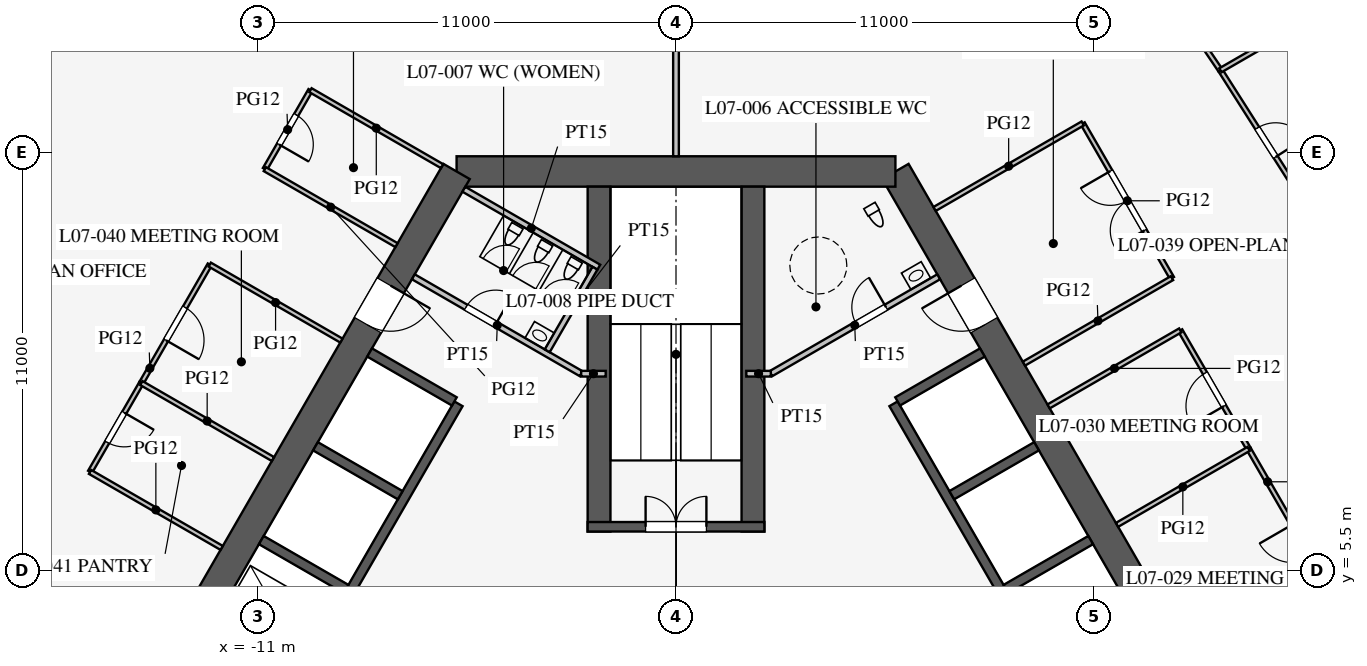
"""IFC4 building model, lengths in metres.
Left out: names, types, materials, properties, quantities, classifications, styles, units other than length and angle.
Written with IfcOpenShell. Run it as: python <this file> out.ifc"""

import sys

from ifc_helpers import new_model, si_unit, direction, frame, frame_2d, origin, place, context, subcontext, project, spatial, rectangle, extrude, element, fill, save


model = new_model("IFC4")
c1 = context("Model", 3, precision=1e-05, world=origin(), true_north=direction((0.0, 1.0)))
c2 = subcontext(c1, "Body", "Model", "MODEL_VIEW")
j1 = project(units=[si_unit("LENGTHUNIT", "METRE"), si_unit("PLANEANGLEUNIT", "RADIAN")], contexts=[c1])
p1 = place(None, origin())
s1 = spatial("IfcSite", under=j1, at=p1, CompositionType="ELEMENT")
p2 = place(p1, origin())
s2 = spatial("IfcBuilding", under=s1, at=p2, CompositionType="ELEMENT")
p3 = place(p2, frame((0.0, 0.0, 33.3)))
s3 = spatial("IfcBuildingStorey", under=s2, at=p3, CompositionType="ELEMENT", Elevation=33.3)
p4 = place(p3, frame((16.743, -3.0, 0.0), z_axis=(0.0, 0.0, 1.0), x_axis=(-0.500002442456, 0.866023993627, 0.0)))
e1 = element("IfcWall", 1, at=p4, inside=s3, PredefinedType="SHEAR", context=c2, shape_type="SweptSolid", body=[
    extrude(rectangle(XDim=21.939, YDim=0.8, at=frame_2d((10.97, 0.0))), origin(), (0.0, 0.0, 1.0), 4.2),
])
p5 = place(p4, frame((17.27, 0.0, 0.0)))
e2 = element("IfcOpeningElement", 2, at=p5, cuts=e1, PredefinedType="OPENING", context=c2, shape_type="SweptSolid", body=[
    extrude(rectangle(XDim=1.2, YDim=2.1, at=frame_2d((0.6, 1.05))), frame((0.0, 0.41, 0.0), z_axis=(0.0, -1.0, 0.0), x_axis=(1.0, 0.0, 0.0)), (0.0, 0.0, 1.0), 0.82),
])
p6 = place(p4, frame((3.47, 0.0, 0.0)))
e3 = element("IfcOpeningElement", 3, at=p6, cuts=e1, PredefinedType="OPENING", context=c2, shape_type="SweptSolid", body=[
    extrude(rectangle(XDim=1.2, YDim=2.1, at=frame_2d((0.6, 1.05))), frame((0.0, 0.41, 0.0), z_axis=(0.0, -1.0, 0.0), x_axis=(1.0, 0.0, 0.0)), (0.0, 0.0, 1.0), 0.82),
])
p7 = place(p3, frame((5.773, 16.0, 0.0), z_axis=(0.0, 0.0, 1.0), x_axis=(-1.0, 0.0, 0.0)))
e4 = element("IfcWall", 4, at=p7, inside=s3, PredefinedType="SHEAR", context=c2, shape_type="SweptSolid", body=[
    extrude(rectangle(XDim=11.547, YDim=0.8, at=frame_2d((5.773, 0.0))), origin(), (0.0, 0.0, 1.0), 4.2),
])
p8 = place(p3, frame((-5.773, 16.0, 0.0), z_axis=(0.0, 0.0, 1.0), x_axis=(-0.500002442456, -0.866023993627, 0.0)))
e5 = element("IfcWall", 5, at=p8, inside=s3, PredefinedType="SHEAR", context=c2, shape_type="SweptSolid", body=[
    extrude(rectangle(XDim=21.939, YDim=0.8, at=frame_2d((10.97, 0.0))), origin(), (0.0, 0.0, 1.0), 4.2),
])
p9 = place(p8, frame((17.27, 0.0, 0.0)))
e6 = element("IfcOpeningElement", 6, at=p9, cuts=e5, PredefinedType="OPENING", context=c2, shape_type="SweptSolid", body=[
    extrude(rectangle(XDim=1.2, YDim=2.1, at=frame_2d((0.6, 1.05))), frame((0.0, 0.41, 0.0), z_axis=(0.0, -1.0, 0.0), x_axis=(1.0, 0.0, 0.0)), (0.0, 0.0, 1.0), 0.82),
])
p10 = place(p8, frame((3.47, 0.0, 0.0)))
e7 = element("IfcOpeningElement", 7, at=p10, cuts=e5, PredefinedType="OPENING", context=c2, shape_type="SweptSolid", body=[
    extrude(rectangle(XDim=1.2, YDim=2.1, at=frame_2d((0.6, 1.05))), frame((0.0, 0.41, 0.0), z_axis=(0.0, -1.0, 0.0), x_axis=(1.0, 0.0, 0.0)), (0.0, 0.0, 1.0), 0.82),
])
p11 = place(p3, frame((11.424, 0.014, 0.0), z_axis=(0.0, 0.0, 1.0), x_axis=(-0.500001763848, 0.866024385424, 0.0)))
e8 = element("IfcWall", 8, at=p11, inside=s3, PredefinedType="SHEAR", context=c2, shape_type="SweptSolid", body=[
    extrude(rectangle(XDim=11.4, YDim=0.25, at=frame_2d((5.7, 0.0))), origin(), (0.0, 0.0, 1.0), 4.2),
])
for number, where, z_axis, x_axis in (
    (9, (8.682, 5.012, 0.0), (0.0, 0.0, 1.0), (0.866, 0.5, 0.0)),
    (10, (7.257, 7.481, 0.0), (0.0, 0.0, 1.0), (0.866, 0.5, 0.0)),
):
    element("IfcWall", number, at=place(p3, frame(where, z_axis=z_axis, x_axis=x_axis)), inside=s3, PredefinedType="SHEAR", context=c2, shape_type="SweptSolid", body=[
        extrude(rectangle(XDim=2.575, YDim=0.25, at=frame_2d((1.288, 0.0))), origin(), (0.0, 0.0, 1.0), 4.2),
    ])
p12 = place(p3, frame((5.832, 9.949, 0.0), z_axis=(0.0, 0.0, 1.0), x_axis=(0.866029291668, 0.499993265928, 0.0)))
e11 = element("IfcWall", 11, at=p12, inside=s3, PredefinedType="SHEAR", context=c2, shape_type="SweptSolid", body=[
    extrude(rectangle(XDim=2.575, YDim=0.25, at=frame_2d((1.288, 0.0))), origin(), (0.0, 0.0, 1.0), 4.2),
])
p13 = place(p3, frame((-5.724, 9.886, 0.0), z_axis=(0.0, 0.0, 1.0), x_axis=(-0.500001763848, -0.866024385424, 0.0)))
e12 = element("IfcWall", 12, at=p13, inside=s3, PredefinedType="SHEAR", context=c2, shape_type="SweptSolid", body=[
    extrude(rectangle(XDim=11.4, YDim=0.25, at=frame_2d((5.7, 0.0))), origin(), (0.0, 0.0, 1.0), 4.2),
])
p14 = place(p13, frame((6.525, 0.0, 0.0)))
e13 = element("IfcOpeningElement", 13, at=p14, cuts=e12, PredefinedType="OPENING", context=c2, shape_type="SweptSolid", body=[
    extrude(rectangle(XDim=1.2, YDim=2.2, at=frame_2d((0.6, 1.1))), frame((0.0, 0.135, 0.0), z_axis=(0.0, -1.0, 0.0), x_axis=(1.0, 0.0, 0.0)), (0.0, 0.0, 1.0), 0.27),
])
p15 = place(p13, frame((9.375, 0.0, 0.0)))
e14 = element("IfcOpeningElement", 14, at=p15, cuts=e12, PredefinedType="OPENING", context=c2, shape_type="SweptSolid", body=[
    extrude(rectangle(XDim=1.2, YDim=2.2, at=frame_2d((0.6, 1.1))), frame((0.0, 0.135, 0.0), z_axis=(0.0, -1.0, 0.0), x_axis=(1.0, 0.0, 0.0)), (0.0, 0.0, 1.0), 0.27),
])
p16 = place(p3, frame((-5.832, 9.949, 0.0), z_axis=(0.0, 0.0, 1.0), x_axis=(-0.866029291668, 0.499993265928, 0.0)))
e15 = element("IfcWall", 15, at=p16, inside=s3, PredefinedType="SHEAR", context=c2, shape_type="SweptSolid", body=[
    extrude(rectangle(XDim=2.575, YDim=0.25, at=frame_2d((1.288, 0.0))), origin(), (0.0, 0.0, 1.0), 4.2),
])
for number, where, z_axis, x_axis in (
    (16, (-7.257, 7.481, 0.0), (0.0, 0.0, 1.0), (-0.866, 0.5, 0.0)),
    (17, (-8.682, 5.012, 0.0), (0.0, 0.0, 1.0), (-0.866, 0.5, 0.0)),
):
    element("IfcWall", number, at=place(p3, frame(where, z_axis=z_axis, x_axis=x_axis)), inside=s3, PredefinedType="SHEAR", context=c2, shape_type="SweptSolid", body=[
        extrude(rectangle(XDim=2.575, YDim=0.25, at=frame_2d((1.288, 0.0))), origin(), (0.0, 0.0, 1.0), 4.2),
    ])
for number, where, z_axis, x_axis in (
    (18, (2.025, 6.525, 0.0), (0.0, 0.0, 1.0), (0.0, 1.0, 0.0)),
    (19, (-2.025, 6.525, 0.0), (0.0, 0.0, 1.0), (0.0, 1.0, 0.0)),
):
    element("IfcWall", number, at=place(p3, frame(where, z_axis=z_axis, x_axis=x_axis)), inside=s3, PredefinedType="SHEAR", context=c2, shape_type="SweptSolid", body=[
        extrude(rectangle(XDim=9.075, YDim=0.6, at=frame_2d((4.538, 0.0))), origin(), (0.0, 0.0, 1.0), 4.2),
    ])
p17 = place(p3, frame((2.325, 6.65, 0.0), z_axis=(0.0, 0.0, 1.0), x_axis=(-1.0, 0.0, 0.0)))
e20 = element("IfcWall", 20, at=p17, inside=s3, PredefinedType="SHEAR", context=c2, shape_type="SweptSolid", body=[
    extrude(rectangle(XDim=4.65, YDim=0.25, at=frame_2d((2.325, 0.0))), origin(), (0.0, 0.0, 1.0), 4.2),
])
p18 = place(p17, frame((1.525, 0.0, 0.0)))
e21 = element("IfcOpeningElement", 21, at=p18, cuts=e20, PredefinedType="OPENING", context=c2, shape_type="SweptSolid", body=[
    extrude(rectangle(XDim=1.6, YDim=2.1, at=frame_2d((0.8, 1.05))), frame((0.0, 0.135, 0.0), z_axis=(0.0, -1.0, 0.0), x_axis=(1.0, 0.0, 0.0)), (0.0, 0.0, 1.0), 0.27),
])
p19 = place(p3, frame((2.495, 10.678, 0.0), z_axis=(0.0, 0.0, 1.0), x_axis=(0.86602216432, 0.500005610874, 0.0)))
e22 = element("IfcWall", 22, at=p19, inside=s3, PredefinedType="PARTITIONING", context=c2, shape_type="SweptSolid", body=[
    extrude(rectangle(XDim=5.1, YDim=0.15, at=frame_2d((2.55, 0.0))), origin(), (0.0, 0.0, 1.0), 4.0),
])
p20 = place(p19, frame((2.6, 0.0, 0.0)))
e23 = element("IfcOpeningElement", 23, at=p20, cuts=e22, PredefinedType="OPENING", context=c2, shape_type="SweptSolid", body=[
    extrude(rectangle(XDim=0.9, YDim=2.1, at=frame_2d((0.45, 1.05))), frame((0.0, 0.085, 0.0), z_axis=(0.0, -1.0, 0.0), x_axis=(1.0, 0.0, 0.0)), (0.0, 0.0, 1.0), 0.17),
])
p21 = place(p3, frame((-2.495, 10.678, 0.0), z_axis=(0.0, 0.0, 1.0), x_axis=(-0.86602216432, 0.500005610874, 0.0)))
e24 = element("IfcWall", 24, at=p21, inside=s3, PredefinedType="PARTITIONING", context=c2, shape_type="SweptSolid", body=[
    extrude(rectangle(XDim=5.1, YDim=0.15, at=frame_2d((2.55, 0.0))), origin(), (0.0, 0.0, 1.0), 4.0),
])
p22 = place(p21, frame((2.6, 0.0, 0.0)))
e25 = element("IfcOpeningElement", 25, at=p22, cuts=e24, PredefinedType="OPENING", context=c2, shape_type="SweptSolid", body=[
    extrude(rectangle(XDim=0.9, YDim=2.1, at=frame_2d((0.45, 1.05))), frame((0.0, 0.085, 0.0), z_axis=(0.0, -1.0, 0.0), x_axis=(1.0, 0.0, 0.0)), (0.0, 0.0, 1.0), 0.17),
])
for number, where, z_axis, x_axis in (
    (26, (2.495, 10.678, 0.0), (0.0, 0.0, 1.0), (-1.0, 0.0, 0.0)),
    (27, (-2.495, 10.678, 0.0), (0.0, 0.0, 1.0), (1.0, 0.0, 0.0)),
):
    element("IfcWall", number, at=place(p3, frame(where, z_axis=z_axis, x_axis=x_axis)), inside=s3, PredefinedType="PARTITIONING", context=c2, shape_type="SweptSolid", body=[
        extrude(rectangle(XDim=0.645, YDim=0.15, at=frame_2d((0.323, 0.0))), origin(), (0.0, 0.0, 1.0), 4.0),
    ])
p23 = place(p3, frame((-2.031, 13.482, 0.0), z_axis=(0.0, 0.0, 1.0), x_axis=(-0.866050731258, 0.499956128963, 0.0)))
e28 = element("IfcWall", 28, at=p23, inside=s3, PredefinedType="PARTITIONING", context=c2, shape_type="SweptSolid", body=[
    extrude(rectangle(XDim=4.1, YDim=0.15, at=frame_2d((2.05, 0.0))), origin(), (0.0, 0.0, 1.0), 4.0),
])
p24 = place(p3, frame((-3.389, 11.281, 0.0), z_axis=(0.0, 0.0, 1.0), x_axis=(0.499989096993, 0.866031698547, 0.0)))
e29 = element("IfcWall", 29, at=p24, inside=s3, PredefinedType="PARTITIONING", context=c2, shape_type="SweptSolid", body=[
    extrude(rectangle(XDim=2.51, YDim=0.15, at=frame_2d((1.255, 0.0))), origin(), (0.0, 0.0, 1.0), 4.0),
])
p25 = place(p3, frame((0.0, 16.4, 0.0), z_axis=(0.0, 0.0, 1.0), x_axis=(0.0, 1.0, 0.0)))
e30 = element("IfcWall", 30, at=p25, inside=s3, PredefinedType="PARTITIONING", context=c2, shape_type="SweptSolid", body=[
    extrude(rectangle(XDim=18.25, YDim=0.15, at=frame_2d((9.125, 0.0))), origin(), (0.0, 0.0, 1.0), 2.3),
])
p26 = place(p3, frame((13.052, 13.194, 0.0), z_axis=(0.0, 0.0, 1.0), x_axis=(-0.499977259774, 0.866038532462, 0.0)))
e31 = element("IfcWall", 31, at=p26, inside=s3, PredefinedType="PARTITIONING", context=c2, shape_type="SweptSolid", body=[
    extrude(rectangle(XDim=4.7, YDim=0.12, at=frame_2d((2.35, 0.0))), origin(), (0.0, 0.0, 1.0), 2.9),
])
p27 = place(p26, frame((1.45, 0.0, 0.15)))
e32 = element("IfcOpeningElement", 32, at=p27, cuts=e31, PredefinedType="OPENING", context=c2, shape_type="SweptSolid", body=[
    extrude(rectangle(XDim=1.8, YDim=2.1, at=frame_2d((0.9, 1.05))), frame((0.0, 0.07, 0.0), z_axis=(0.0, -1.0, 0.0), x_axis=(1.0, 0.0, 0.0)), (0.0, 0.0, 1.0), 0.14),
])
p28 = place(p3, frame((15.069, 8.7, 0.0), z_axis=(0.0, 0.0, 1.0), x_axis=(-0.500012057535, 0.866018442252, 0.0)))
e33 = element("IfcWall", 33, at=p28, inside=s3, PredefinedType="PARTITIONING", context=c2, shape_type="SweptSolid", body=[
    extrude(rectangle(XDim=3.6, YDim=0.12, at=frame_2d((1.8, 0.0))), origin(), (0.0, 0.0, 1.0), 2.9),
])
p29 = place(p28, frame((1.3, 0.0, 0.15)))
e34 = element("IfcOpeningElement", 34, at=p29, cuts=e33, PredefinedType="OPENING", context=c2, shape_type="SweptSolid", body=[
    extrude(rectangle(XDim=1.0, YDim=2.1, at=frame_2d((0.5, 1.05))), frame((0.0, 0.07, 0.0), z_axis=(0.0, -1.0, 0.0), x_axis=(1.0, 0.0, 0.0)), (0.0, 0.0, 1.0), 0.14),
])
p30 = place(p3, frame((17.869, 3.85, 0.0), z_axis=(0.0, 0.0, 1.0), x_axis=(-0.500016814911, 0.866015695474, 0.0)))
e35 = element("IfcWall", 35, at=p30, inside=s3, PredefinedType="PARTITIONING", context=c2, shape_type="SweptSolid", body=[
    extrude(rectangle(XDim=5.6, YDim=0.12, at=frame_2d((2.8, 0.0))), origin(), (0.0, 0.0, 1.0), 2.9),
])
p31 = place(p30, frame((2.3, 0.0, 0.15)))
e36 = element("IfcOpeningElement", 36, at=p31, cuts=e35, PredefinedType="OPENING", context=c2, shape_type="SweptSolid", body=[
    extrude(rectangle(XDim=1.0, YDim=2.1, at=frame_2d((0.5, 1.05))), frame((0.0, 0.07, 0.0), z_axis=(0.0, -1.0, 0.0), x_axis=(1.0, 0.0, 0.0)), (0.0, 0.0, 1.0), 0.14),
])
p32 = place(p3, frame((9.805, 9.818, 0.0), z_axis=(0.0, 0.0, 1.0), x_axis=(0.866026010844, 0.49999894854, 0.0)))
e37 = element("IfcWall", 37, at=p32, inside=s3, PredefinedType="PARTITIONING", context=c2, shape_type="SweptSolid", body=[
    extrude(rectangle(XDim=4.0, YDim=0.12, at=frame_2d((2.0, 0.0))), origin(), (0.0, 0.0, 1.0), 2.9),
])
p33 = place(p3, frame((9.155, 10.944, 0.0), z_axis=(0.0, 0.0, 1.0), x_axis=(0.866017533419, 0.500013631625, 0.0)))
e38 = element("IfcWall", 38, at=p33, inside=s3, PredefinedType="PARTITIONING", context=c2, shape_type="SweptSolid", body=[
    extrude(rectangle(XDim=4.5, YDim=0.12, at=frame_2d((2.25, 0.0))), origin(), (0.0, 0.0, 1.0), 2.9),
])
p34 = place(p3, frame((6.805, 15.014, 0.0), z_axis=(0.0, 0.0, 1.0), x_axis=(0.866031096941, 0.499990139034, 0.0)))
e39 = element("IfcWall", 39, at=p34, inside=s3, PredefinedType="PARTITIONING", context=c2, shape_type="SweptSolid", body=[
    extrude(rectangle(XDim=4.5, YDim=0.12, at=frame_2d((2.25, 0.0))), origin(), (0.0, 0.0, 1.0), 2.9),
])
p35 = place(p3, frame((11.605, 6.7, 0.0), z_axis=(0.0, 0.0, 1.0), x_axis=(0.866026010844, 0.49999894854, 0.0)))
e40 = element("IfcWall", 40, at=p35, inside=s3, PredefinedType="PARTITIONING", context=c2, shape_type="SweptSolid", body=[
    extrude(rectangle(XDim=4.0, YDim=0.12, at=frame_2d((2.0, 0.0))), origin(), (0.0, 0.0, 1.0), 2.9),
])
p36 = place(p3, frame((16.745, 14.864, 0.0), z_axis=(0.0, 0.0, 1.0), x_axis=(-0.537205132487, 0.843451626135, 0.0)))
e41 = element("IfcWall", 41, at=p36, inside=s3, PredefinedType="PARTITIONING", context=c2, shape_type="SweptSolid", body=[
    extrude(rectangle(XDim=4.504, YDim=0.12, at=frame_2d((2.252, 0.0))), origin(), (0.0, 0.0, 1.0), 2.9),
])
p37 = place(p36, frame((1.8, 0.0, 0.15)))
e42 = element("IfcOpeningElement", 42, at=p37, cuts=e41, PredefinedType="OPENING", context=c2, shape_type="SweptSolid", body=[
    extrude(rectangle(XDim=0.9, YDim=2.1, at=frame_2d((0.45, 1.05))), frame((0.0, 0.07, 0.0), z_axis=(0.0, -1.0, 0.0), x_axis=(1.0, 0.0, 0.0)), (0.0, 0.0, 1.0), 0.14),
])
p38 = place(p3, frame((14.325, 18.663, 0.0), z_axis=(0.0, 0.0, 1.0), x_axis=(-0.561512004239, 0.827468591002, 0.0)))
e43 = element("IfcWall", 43, at=p38, inside=s3, PredefinedType="PARTITIONING", context=c2, shape_type="SweptSolid", body=[
    extrude(rectangle(XDim=4.512, YDim=0.12, at=frame_2d((2.256, 0.0))), origin(), (0.0, 0.0, 1.0), 2.9),
])
p39 = place(p38, frame((1.8, 0.0, 0.15)))
e44 = element("IfcOpeningElement", 44, at=p39, cuts=e43, PredefinedType="OPENING", context=c2, shape_type="SweptSolid", body=[
    extrude(rectangle(XDim=0.9, YDim=2.1, at=frame_2d((0.45, 1.05))), frame((0.0, 0.07, 0.0), z_axis=(0.0, -1.0, 0.0), x_axis=(1.0, 0.0, 0.0)), (0.0, 0.0, 1.0), 0.14),
])
p40 = place(p3, frame((14.325, 18.663, 0.0), z_axis=(0.0, 0.0, 1.0), x_axis=(0.866009971343, 0.50002672882, 0.0)))
e45 = element("IfcWall", 45, at=p40, inside=s3, PredefinedType="PARTITIONING", context=c2, shape_type="SweptSolid", body=[
    extrude(rectangle(XDim=4.167, YDim=0.12, at=frame_2d((2.083, 0.0))), origin(), (0.0, 0.0, 1.0), 2.9),
])
p41 = place(p3, frame((-9.619, 18.14, 0.0), z_axis=(0.0, 0.0, 1.0), x_axis=(-0.500001309137, -0.866024647952, 0.0)))
e46 = element("IfcWall", 46, at=p41, inside=s3, PredefinedType="PARTITIONING", context=c2, shape_type="SweptSolid", body=[
    extrude(rectangle(XDim=2.4, YDim=0.12, at=frame_2d((1.2, 0.0))), origin(), (0.0, 0.0, 1.0), 2.9),
])
p42 = place(p41, frame((0.75, 0.0, 0.15)))
e47 = element("IfcOpeningElement", 47, at=p42, cuts=e46, PredefinedType="OPENING", context=c2, shape_type="SweptSolid", body=[
    extrude(rectangle(XDim=0.9, YDim=2.1, at=frame_2d((0.45, 1.05))), frame((0.0, 0.07, 0.0), z_axis=(0.0, -1.0, 0.0), x_axis=(1.0, 0.0, 0.0)), (0.0, 0.0, 1.0), 0.14),
])
p43 = place(p3, frame((-14.069, 10.432, 0.0), z_axis=(0.0, 0.0, 1.0), x_axis=(-0.50000943426, -0.866019956843, 0.0)))
e48 = element("IfcWall", 48, at=p43, inside=s3, PredefinedType="PARTITIONING", context=c2, shape_type="SweptSolid", body=[
    extrude(rectangle(XDim=2.7, YDim=0.12, at=frame_2d((1.35, 0.0))), origin(), (0.0, 0.0, 1.0), 2.9),
])
p44 = place(p43, frame((0.9, 0.0, 0.15)))
e49 = element("IfcOpeningElement", 49, at=p44, cuts=e48, PredefinedType="OPENING", context=c2, shape_type="SweptSolid", body=[
    extrude(rectangle(XDim=0.9, YDim=2.1, at=frame_2d((0.45, 1.05))), frame((0.0, 0.07, 0.0), z_axis=(0.0, -1.0, 0.0), x_axis=(1.0, 0.0, 0.0)), (0.0, 0.0, 1.0), 0.14),
])
p45 = place(p3, frame((-12.269, 13.55, 0.0), z_axis=(0.0, 0.0, 1.0), x_axis=(-0.500012057535, -0.866018442252, 0.0)))
e50 = element("IfcWall", 50, at=p45, inside=s3, PredefinedType="PARTITIONING", context=c2, shape_type="SweptSolid", body=[
    extrude(rectangle(XDim=3.6, YDim=0.12, at=frame_2d((1.8, 0.0))), origin(), (0.0, 0.0, 1.0), 2.9),
])
p46 = place(p45, frame((1.3, 0.0, 0.15)))
e51 = element("IfcOpeningElement", 51, at=p46, cuts=e50, PredefinedType="OPENING", context=c2, shape_type="SweptSolid", body=[
    extrude(rectangle(XDim=1.0, YDim=2.1, at=frame_2d((0.5, 1.05))), frame((0.0, 0.07, 0.0), z_axis=(0.0, -1.0, 0.0), x_axis=(1.0, 0.0, 0.0)), (0.0, 0.0, 1.0), 0.14),
])
for number, where, z_axis, x_axis in (
    (52, (-11.955, 6.094, 0.0), (0.0, 0.0, 1.0), (-0.866, 0.5, 0.0)),
    (53, (-6.155, 16.14, 0.0), (0.0, 0.0, 1.0), (-0.866, 0.5, 0.0)),
    (54, (-10.605, 8.432, 0.0), (0.0, 0.0, 1.0), (-0.866, 0.5, 0.0)),
    (55, (-8.805, 11.55, 0.0), (0.0, 0.0, 1.0), (-0.866, 0.5, 0.0)),
    (56, (-7.355, 14.061, 0.0), (0.0, 0.0, 1.0), (-0.866, 0.5, 0.0)),
):
    element("IfcWall", number, at=place(p3, frame(where, z_axis=z_axis, x_axis=x_axis)), inside=s3, PredefinedType="PARTITIONING", context=c2, shape_type="SweptSolid", body=[
        extrude(rectangle(XDim=4.0, YDim=0.12, at=frame_2d((2.0, 0.0))), origin(), (0.0, 0.0, 1.0), 2.9),
    ])
p47 = place(p20, origin())
e57 = element("IfcDoor", 57, at=p47, inside=s3, OperationType="SINGLE_SWING_RIGHT", PredefinedType="DOOR", context=c2, shape_type="SweptSolid", body=[
    extrude(rectangle(XDim=0.9, YDim=2.1, at=frame_2d((0.45, 1.05))), frame((0.0, 0.025, 0.0), z_axis=(0.0, -1.0, 0.0), x_axis=(1.0, 0.0, 0.0)), (0.0, 0.0, 1.0), 0.05),
])
fill(e23, e57)
p48 = place(p22, frame((0.9, 0.0, 0.0), z_axis=(0.0, 0.0, 1.0), x_axis=(-1.0, 0.0, 0.0)))
e58 = element("IfcDoor", 58, at=p48, inside=s3, OperationType="SINGLE_SWING_RIGHT", PredefinedType="DOOR", context=c2, shape_type="SweptSolid", body=[
    extrude(rectangle(XDim=0.9, YDim=2.1, at=frame_2d((0.45, 1.05))), frame((0.0, 0.025, 0.0), z_axis=(0.0, -1.0, 0.0), x_axis=(1.0, 0.0, 0.0)), (0.0, 0.0, 1.0), 0.05),
])
fill(e25, e58)
p49 = place(p18, frame((1.6, 0.0, 0.0), z_axis=(0.0, 0.0, 1.0), x_axis=(-1.0, 0.0, 0.0)))
e59 = element("IfcDoor", 59, at=p49, inside=s3, OperationType="DOUBLE_DOOR_SINGLE_SWING", PredefinedType="DOOR", context=c2, shape_type="SweptSolid", body=[
    extrude(rectangle(XDim=1.6, YDim=2.1, at=frame_2d((0.8, 1.05))), frame((0.0, 0.025, 0.0), z_axis=(0.0, -1.0, 0.0), x_axis=(1.0, 0.0, 0.0)), (0.0, 0.0, 1.0), 0.05),
])
fill(e21, e59)
p50 = place(p5, origin())
e60 = element("IfcDoor", 60, at=p50, inside=s3, OperationType="SINGLE_SWING_RIGHT", PredefinedType="DOOR", context=c2, shape_type="SweptSolid", body=[
    extrude(rectangle(XDim=1.2, YDim=2.1, at=frame_2d((0.6, 1.05))), frame((0.0, 0.025, 0.0), z_axis=(0.0, -1.0, 0.0), x_axis=(1.0, 0.0, 0.0)), (0.0, 0.0, 1.0), 0.05),
])
fill(e2, e60)
p51 = place(p10, origin())
e61 = element("IfcDoor", 61, at=p51, inside=s3, OperationType="SINGLE_SWING_LEFT", PredefinedType="DOOR", context=c2, shape_type="SweptSolid", body=[
    extrude(rectangle(XDim=1.2, YDim=2.1, at=frame_2d((0.6, 1.05))), frame((0.0, 0.025, 0.0), z_axis=(0.0, -1.0, 0.0), x_axis=(1.0, 0.0, 0.0)), (0.0, 0.0, 1.0), 0.05),
])
fill(e7, e61)
p52 = place(p27, origin())
e62 = element("IfcDoor", 62, at=p52, inside=s3, OperationType="DOUBLE_DOOR_SINGLE_SWING", PredefinedType="DOOR", context=c2, shape_type="SweptSolid", body=[
    extrude(rectangle(XDim=1.8, YDim=2.1, at=frame_2d((0.9, 1.05))), frame((0.0, 0.025, 0.0), z_axis=(0.0, -1.0, 0.0), x_axis=(1.0, 0.0, 0.0)), (0.0, 0.0, 1.0), 0.05),
])
fill(e32, e62)
p53 = place(p29, origin())
e63 = element("IfcDoor", 63, at=p53, inside=s3, OperationType="SINGLE_SWING_LEFT", PredefinedType="DOOR", context=c2, shape_type="SweptSolid", body=[
    extrude(rectangle(XDim=1.0, YDim=2.1, at=frame_2d((0.5, 1.05))), frame((0.0, 0.025, 0.0), z_axis=(0.0, -1.0, 0.0), x_axis=(1.0, 0.0, 0.0)), (0.0, 0.0, 1.0), 0.05),
])
fill(e34, e63)
p54 = place(p37, frame((0.9, 0.0, 0.0), z_axis=(0.0, 0.0, 1.0), x_axis=(-1.0, 0.0, 0.0)))
e64 = element("IfcDoor", 64, at=p54, inside=s3, OperationType="SINGLE_SWING_RIGHT", PredefinedType="DOOR", context=c2, shape_type="SweptSolid", body=[
    extrude(rectangle(XDim=0.9, YDim=2.1, at=frame_2d((0.45, 1.05))), frame((0.0, 0.025, 0.0), z_axis=(0.0, -1.0, 0.0), x_axis=(1.0, 0.0, 0.0)), (0.0, 0.0, 1.0), 0.05),
])
fill(e42, e64)
p55 = place(p46, origin())
e65 = element("IfcDoor", 65, at=p55, inside=s3, OperationType="SINGLE_SWING_RIGHT", PredefinedType="DOOR", context=c2, shape_type="SweptSolid", body=[
    extrude(rectangle(XDim=1.0, YDim=2.1, at=frame_2d((0.5, 1.05))), frame((0.0, 0.025, 0.0), z_axis=(0.0, -1.0, 0.0), x_axis=(1.0, 0.0, 0.0)), (0.0, 0.0, 1.0), 0.05),
])
fill(e51, e65)
p56 = place(p44, origin())
e66 = element("IfcDoor", 66, at=p56, inside=s3, OperationType="SINGLE_SWING_LEFT", PredefinedType="DOOR", context=c2, shape_type="SweptSolid", body=[
    extrude(rectangle(XDim=0.9, YDim=2.1, at=frame_2d((0.45, 1.05))), frame((0.0, 0.025, 0.0), z_axis=(0.0, -1.0, 0.0), x_axis=(1.0, 0.0, 0.0)), (0.0, 0.0, 1.0), 0.05),
])
fill(e49, e66)
p57 = place(p42, origin())
e67 = element("IfcDoor", 67, at=p57, inside=s3, OperationType="SINGLE_SWING_RIGHT", PredefinedType="DOOR", context=c2, shape_type="SweptSolid", body=[
    extrude(rectangle(XDim=0.9, YDim=2.1, at=frame_2d((0.45, 1.05))), frame((0.0, 0.025, 0.0), z_axis=(0.0, -1.0, 0.0), x_axis=(1.0, 0.0, 0.0)), (0.0, 0.0, 1.0), 0.05),
])
fill(e47, e67)
save(model, sys.argv[1])
